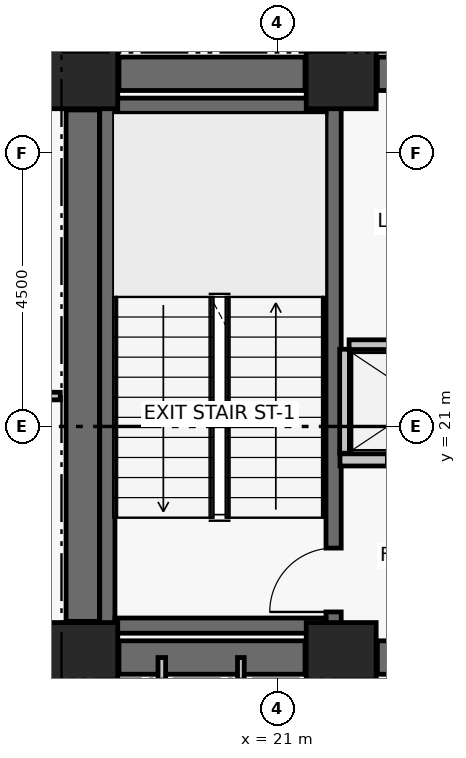
"""IFC4 building model, lengths in metres.
Left out: names, types, materials, properties, quantities, classifications, styles, units other than length and angle.
Written with IfcOpenShell. Run it as: python <this file> out.ifc"""

import sys

from ifc_helpers import new_model, si_unit, direction, frame, frame_2d, origin, origin_2d, place, context, subcontext, project, spatial, rectangle, extrude, element, fill, save


model = new_model("IFC4")
c1 = context("Model", 3, precision=1e-05, world=origin(), true_north=direction((0.0, 1.0)))
c2 = subcontext(c1, "Body", "Model", "MODEL_VIEW")
j1 = project(units=[si_unit("LENGTHUNIT", "METRE"), si_unit("PLANEANGLEUNIT", "RADIAN")], contexts=[c1])
p1 = place(None, origin())
s1 = spatial("IfcSite", under=j1, at=p1, CompositionType="ELEMENT")
p2 = place(p1, origin())
s2 = spatial("IfcBuilding", under=s1, at=p2, CompositionType="ELEMENT")
p3 = place(p2, frame((0.0, 0.0, 111.42)))
s3 = spatial("IfcBuildingStorey", under=s2, at=p3, CompositionType="ELEMENT", Elevation=111.42)
for number, where, z_axis, x_axis in (
    (1, (17.8, 17.2, 0.0), (0.0, 0.0, 1.0), (1.0, 0.0, 0.0)),
    (2, (22.05, 17.2, 0.0), (0.0, 0.0, 1.0), (1.0, 0.0, 0.0)),
    (3, (17.8, 26.8, 0.0), (0.0, 0.0, 1.0), (1.0, 0.0, 0.0)),
    (4, (22.05, 26.8, 0.0), (0.0, 0.0, 1.0), (1.0, 0.0, 0.0)),
):
    element("IfcColumn", number, at=place(p3, frame(where, z_axis=z_axis, x_axis=x_axis)), inside=s3, PredefinedType="COLUMN", context=c2, shape_type="SweptSolid", body=[
        extrude(rectangle(XDim=1.15, YDim=1.15, at=origin_2d()), origin(), (0.0, 0.0, 1.0), 3.72),
    ])
p4 = place(p3, frame((18.395, 17.2, 0.0), z_axis=(0.0, 0.0, 1.0), x_axis=(1.0, 0.0, 0.0)))
e5 = element("IfcWall", 5, at=p4, inside=s3, PredefinedType="SHEAR", context=c2, shape_type="SweptSolid", body=[
    extrude(rectangle(XDim=3.06, YDim=0.55, at=frame_2d((1.53, 0.0))), origin(), (0.0, 0.0, 1.0), 3.47),
])
p5 = place(p3, frame((22.645, 17.2, 0.0), z_axis=(0.0, 0.0, 1.0), x_axis=(1.0, 0.0, 0.0)))
e6 = element("IfcWall", 6, at=p5, inside=s3, PredefinedType="SHEAR", context=c2, shape_type="SweptSolid", body=[
    extrude(rectangle(XDim=1.705, YDim=0.55, at=frame_2d((0.853, 0.0))), origin(), (0.0, 0.0, 1.0), 3.47),
])
p6 = place(p3, frame((18.395, 26.8, 0.0), z_axis=(0.0, 0.0, 1.0), x_axis=(1.0, 0.0, 0.0)))
e7 = element("IfcWall", 7, at=p6, inside=s3, PredefinedType="SHEAR", context=c2, shape_type="SweptSolid", body=[
    extrude(rectangle(XDim=3.06, YDim=0.55, at=frame_2d((1.53, 0.0))), origin(), (0.0, 0.0, 1.0), 3.47),
])
p7 = place(p3, frame((22.645, 26.8, 0.0), z_axis=(0.0, 0.0, 1.0), x_axis=(1.0, 0.0, 0.0)))
e8 = element("IfcWall", 8, at=p7, inside=s3, PredefinedType="SHEAR", context=c2, shape_type="SweptSolid", body=[
    extrude(rectangle(XDim=1.705, YDim=0.55, at=frame_2d((0.853, 0.0))), origin(), (0.0, 0.0, 1.0), 3.47),
])
p8 = place(p3, frame((17.8, 17.795, 0.0), z_axis=(0.0, 0.0, 1.0), x_axis=(0.0, 1.0, 0.0)))
e9 = element("IfcWall", 9, at=p8, inside=s3, PredefinedType="SHEAR", context=c2, shape_type="SweptSolid", body=[
    extrude(rectangle(XDim=8.41, YDim=0.55, at=frame_2d((4.205, 0.0))), origin(), (0.0, 0.0, 1.0), 3.47),
])
p9 = place(p3, frame((18.204, 17.6, 0.0), z_axis=(0.0, 0.0, 1.0), x_axis=(0.0, 1.0, 0.0)))
e10 = element("IfcWall", 10, at=p9, inside=s3, PredefinedType="SHEAR", context=c2, shape_type="SweptSolid", body=[
    extrude(rectangle(XDim=8.8, YDim=0.25, at=frame_2d((4.4, 0.0))), origin(), (0.0, 0.0, 1.0), 3.47),
])
p10 = place(p3, frame((21.925, 17.6, 0.0), z_axis=(0.0, 0.0, 1.0), x_axis=(0.0, 1.0, 0.0)))
e11 = element("IfcWall", 11, at=p10, inside=s3, PredefinedType="SHEAR", context=c2, shape_type="SweptSolid", body=[
    extrude(rectangle(XDim=8.8, YDim=0.25, at=frame_2d((4.4, 0.0))), origin(), (0.0, 0.0, 1.0), 3.47),
])
p11 = place(p10, frame((0.35, 0.0, 0.0)))
e12 = element("IfcOpeningElement", 12, at=p11, cuts=e11, PredefinedType="OPENING", context=c2, shape_type="SweptSolid", body=[
    extrude(rectangle(XDim=1.05, YDim=2.08, at=frame_2d((0.525, 1.04))), frame((0.0, 0.135, 0.0), z_axis=(0.0, -1.0, 0.0), x_axis=(1.0, 0.0, 0.0)), (0.0, 0.0, 1.0), 0.27),
])
for number, where, z_axis, x_axis in (
    (13, (18.329, 17.725, 0.0), (0.0, 0.0, 1.0), (1.0, 0.0, 0.0)),
    (14, (18.329, 26.275, 0.0), (0.0, 0.0, 1.0), (1.0, 0.0, 0.0)),
):
    element("IfcWall", number, at=place(p3, frame(where, z_axis=z_axis, x_axis=x_axis)), inside=s3, PredefinedType="SHEAR", context=c2, shape_type="SweptSolid", body=[
        extrude(rectangle(XDim=3.471, YDim=0.25, at=frame_2d((1.735, 0.0))), origin(), (0.0, 0.0, 1.0), 3.47),
    ])
p12 = place(p3, frame((22.03, 20.45, 0.0), z_axis=(0.0, 0.0, 1.0), x_axis=(1.0, 0.0, 0.0)))
e15 = element("IfcWall", 15, at=p12, inside=s3, PredefinedType="PARTITIONING", context=c2, shape_type="SweptSolid", body=[
    extrude(rectangle(XDim=2.8, YDim=0.2, at=frame_2d((1.4, 0.0))), origin(), (0.0, 0.0, 1.0), 3.47),
])
p13 = place(p12, frame((0.78, 0.0, 0.0)))
e16 = element("IfcOpeningElement", 16, at=p13, cuts=e15, PredefinedType="OPENING", context=c2, shape_type="SweptSolid", body=[
    extrude(rectangle(XDim=1.1, YDim=2.08, at=frame_2d((0.55, 1.04))), frame((0.0, 0.11, 0.0), z_axis=(0.0, -1.0, 0.0), x_axis=(1.0, 0.0, 0.0)), (0.0, 0.0, 1.0), 0.22),
])
p14 = place(p3, frame((22.105, 20.56, 0.0), z_axis=(0.0, 0.0, 1.0), x_axis=(0.0, 1.0, 0.0)))
e17 = element("IfcWall", 17, at=p14, inside=s3, PredefinedType="PARTITIONING", context=c2, shape_type="SweptSolid", body=[
    extrude(rectangle(XDim=1.71, YDim=0.16, at=frame_2d((0.855, 0.0))), origin(), (0.0, 0.0, 1.0), 3.47),
])
p15 = place(p3, frame((22.18, 22.345, 0.0), z_axis=(0.0, 0.0, 1.0), x_axis=(1.0, 0.0, 0.0)))
e18 = element("IfcWall", 18, at=p15, inside=s3, PredefinedType="PARTITIONING", context=c2, shape_type="SweptSolid", body=[
    extrude(rectangle(XDim=2.65, YDim=0.16, at=frame_2d((1.325, 0.0))), origin(), (0.0, 0.0, 1.0), 3.47),
])
p16 = place(p3, frame((19.1, 14.95, 0.0), z_axis=(0.0, 0.0, 1.0), x_axis=(0.0, 1.0, 0.0)))
e19 = element("IfcWall", 19, at=p16, inside=s3, PredefinedType="PARTITIONING", context=c2, shape_type="SweptSolid", body=[
    extrude(rectangle(XDim=2.25, YDim=0.125, at=frame_2d((1.125, 0.0))), origin(), (0.0, 0.0, 1.0), 2.6),
])
p17 = place(p3, frame((20.4, 14.95, 0.0), z_axis=(0.0, 0.0, 1.0), x_axis=(0.0, 1.0, 0.0)))
e20 = element("IfcWall", 20, at=p17, inside=s3, PredefinedType="PARTITIONING", context=c2, shape_type="SweptSolid", body=[
    extrude(rectangle(XDim=2.25, YDim=0.11, at=frame_2d((1.125, 0.0))), origin(), (0.0, 0.0, 1.0), 2.6),
])
p18 = place(p3, frame((15.2, 27.06, 0.0), z_axis=(0.0, 0.0, 1.0), x_axis=(1.0, 0.0, 0.0)))
e21 = element("IfcWall", 21, at=p18, inside=s3, PredefinedType="PARTITIONING", context=c2, shape_type="SweptSolid", body=[
    extrude(rectangle(XDim=2.18, YDim=0.145, at=frame_2d((1.09, 0.0))), origin(), (0.0, 0.0, 1.0), 2.65),
])
p19 = place(p3, frame((3.128, 21.5, 0.0), z_axis=(0.0, 0.0, 1.0), x_axis=(1.0, 0.0, 0.0)))
e22 = element("IfcWall", 22, at=p19, inside=s3, PredefinedType="PARTITIONING", context=c2, shape_type="SweptSolid", body=[
    extrude(rectangle(XDim=14.302, YDim=0.125, at=frame_2d((7.151, 0.0))), origin(), (0.0, 0.0, 1.0), 2.6),
])
p20 = place(p19, frame((0.28, 0.0, 0.0)))
e23 = element("IfcOpeningElement", 23, at=p20, cuts=e22, PredefinedType="OPENING", context=c2, shape_type="SweptSolid", body=[
    extrude(rectangle(XDim=0.92, YDim=2.05, at=frame_2d((0.46, 1.025))), frame((0.0, 0.073, 0.0), z_axis=(0.0, -1.0, 0.0), x_axis=(1.0, 0.0, 0.0)), (0.0, 0.0, 1.0), 0.145),
])
p21 = place(p11, origin())
e24 = element("IfcDoor", 24, at=p21, inside=s3, OperationType="SINGLE_SWING_LEFT", PredefinedType="DOOR", context=c2, shape_type="SweptSolid", body=[
    extrude(rectangle(XDim=1.05, YDim=2.08, at=frame_2d((0.525, 1.04))), frame((0.0, 0.025, 0.0), z_axis=(0.0, -1.0, 0.0), x_axis=(1.0, 0.0, 0.0)), (0.0, 0.0, 1.0), 0.05),
])
fill(e12, e24)
save(model, sys.argv[1])
